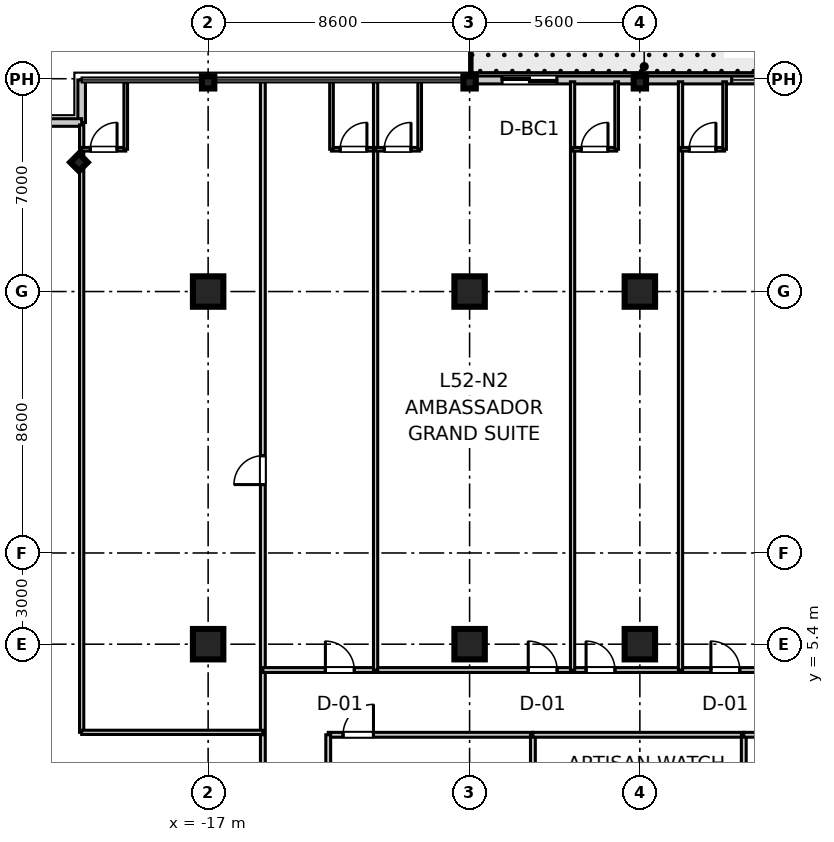
"""IFC4 building model, lengths in metres.
Left out: names, types, materials, properties, quantities, classifications, styles, units other than length and angle.
Written with IfcOpenShell. Run it as: python <this file> out.ifc"""

import sys

from ifc_helpers import new_model, si_unit, direction, frame, frame_2d, origin, origin_2d, place, context, subcontext, project, spatial, rectangle, i_section, extrude, source, transform, mapped, element, fill, save


model = new_model("IFC4")
c1 = context("Model", 3, precision=1e-05, world=origin(), true_north=direction((0.0, 1.0)))
c2 = subcontext(c1, "Body", "Model", "MODEL_VIEW")
j1 = project(units=[si_unit("LENGTHUNIT", "METRE"), si_unit("PLANEANGLEUNIT", "RADIAN")], contexts=[c1])
p1 = place(None, origin())
s1 = spatial("IfcSite", under=j1, at=p1, CompositionType="ELEMENT")
p2 = place(p1, origin())
s2 = spatial("IfcBuilding", under=s1, at=p2, CompositionType="ELEMENT")
p3 = place(p2, frame((0.0, 0.0, 204.9)))
s3 = spatial("IfcBuildingStorey", under=s2, at=p3, CompositionType="ELEMENT", Elevation=204.9)
m1 = source(origin(), c2, "Body", "SweptSolid", [
    extrude(rectangle(XDim=1.0, YDim=1.0, at=origin_2d()), origin(), (0.0, 0.0, 1.0), 3.655),
])
for number, where, z_axis, x_axis in (
    (1, (-17.0, 5.4, 0.0), (0.0, 0.0, 1.0), (1.0, 0.0, 0.0)),
    (2, (-17.0, 17.0, 0.0), (0.0, 0.0, 1.0), (1.0, 0.0, 0.0)),
    (3, (-8.4, 5.4, 0.0), (0.0, 0.0, 1.0), (1.0, 0.0, 0.0)),
    (4, (-8.4, 17.0, 0.0), (0.0, 0.0, 1.0), (1.0, 0.0, 0.0)),
    (5, (-2.8, 5.4, 0.0), (0.0, 0.0, 1.0), (1.0, 0.0, 0.0)),
    (6, (-2.8, 17.0, 0.0), (0.0, 0.0, 1.0), (1.0, 0.0, 0.0)),
):
    element("IfcColumn", number, at=place(p3, frame(where, z_axis=z_axis, x_axis=x_axis)), inside=s3, PredefinedType="COLUMN", context=c2, shape_type="MappedRepresentation", body=[
        mapped(m1, transform((0.0, 0.0, 0.0), scale=1.0)),
    ])
m2 = source(origin(), c2, "Body", "SweptSolid", [
    extrude(i_section(OverallWidth=0.401, OverallDepth=0.406, WebThickness=0.016, FlangeThickness=0.025, at=origin_2d()), origin(), (0.0, 0.0, 1.0), 3.655),
])
for number, where, z_axis, x_axis in (
    (7, (-17.0, 23.88, 0.0), (0.0, 0.0, 1.0), (0.0, 1.0, 0.0)),
    (8, (-8.4, 23.88, 0.0), (0.0, 0.0, 1.0), (0.0, 1.0, 0.0)),
    (9, (-2.8, 23.88, 0.0), (0.0, 0.0, 1.0), (0.0, 1.0, 0.0)),
    (10, (-21.25, 21.25, 0.0), (0.0, 0.0, 1.0), (0.707, 0.707, 0.0)),
):
    element("IfcColumn", number, at=place(p3, frame(where, z_axis=z_axis, x_axis=x_axis)), inside=s3, PredefinedType="COLUMN", context=c2, shape_type="MappedRepresentation", body=[
        mapped(m2, transform((0.0, 0.0, 0.0), scale=1.0)),
    ])
m3 = source(origin(), c2, "Body", "SweptSolid", [
    extrude(rectangle(XDim=1.4, YDim=0.25, at=frame_2d((0.7, 0.0))), origin(), (0.0, 0.0, 1.0), 3.41),
])
p4 = place(p3, frame((-21.16, 22.56, 0.0), z_axis=(0.0, 0.0, 1.0), x_axis=(0.0, 1.0, 0.0)))
e11 = element("IfcWall", 11, at=p4, inside=s3, PredefinedType="STANDARD", context=c2, shape_type="MappedRepresentation", body=[
    mapped(m3, transform((0.0, 0.0, 0.0), scale=1.0)),
])
m4 = source(origin(), c2, "Body", "SweptSolid", [
    extrude(rectangle(XDim=1.4, YDim=0.25, at=frame_2d((0.7, 0.0))), origin(), (0.0, 0.0, 1.0), 3.41),
])
p5 = place(p3, frame((-22.56, 22.56, 0.0), z_axis=(0.0, 0.0, 1.0), x_axis=(1.0, 0.0, 0.0)))
e12 = element("IfcWall", 12, at=p5, inside=s3, PredefinedType="STANDARD", context=c2, shape_type="MappedRepresentation", body=[
    mapped(m4, transform((0.0, 0.0, 0.0), scale=1.0)),
])
m5 = source(origin(), c2, "Body", "SweptSolid", [
    extrude(rectangle(XDim=11.2, YDim=0.26, at=frame_2d((5.6, 0.0))), origin(), (0.0, 0.0, 1.0), 2.89),
])
p6 = place(p3, frame((-8.4, 23.96, 0.0), z_axis=(0.0, 0.0, 1.0), x_axis=(1.0, 0.0, 0.0)))
e13 = element("IfcWall", 13, at=p6, inside=s3, PredefinedType="STANDARD", context=c2, shape_type="MappedRepresentation", body=[
    mapped(m5, transform((0.0, 0.0, 0.0), scale=1.0)),
])
p7 = place(p6, frame((1.069, 0.0, 0.0)))
e14 = element("IfcOpeningElement", 14, at=p7, cuts=e13, PredefinedType="OPENING", context=c2, shape_type="SweptSolid", body=[
    extrude(rectangle(XDim=1.8, YDim=2.25, at=frame_2d((0.9, 1.125))), frame((0.0, 0.14, 0.0), z_axis=(0.0, -1.0, 0.0), x_axis=(1.0, 0.0, 0.0)), (0.0, 0.0, 1.0), 0.28),
])
p8 = place(p6, frame((8.619, 0.0, 0.85)))
e15 = element("IfcOpeningElement", 15, at=p8, cuts=e13, PredefinedType="OPENING", context=c2, shape_type="SweptSolid", body=[
    extrude(rectangle(XDim=1.8, YDim=1.5, at=frame_2d((0.9, 0.75))), frame((0.0, 0.14, 0.0), z_axis=(0.0, -1.0, 0.0), x_axis=(1.0, 0.0, 0.0)), (0.0, 0.0, 1.0), 0.28),
])
m6 = source(origin(), c2, "Body", "SweptSolid", [
    extrude(rectangle(XDim=21.4, YDim=0.16, at=frame_2d((10.7, 0.0))), origin(), (0.0, 0.0, 1.0), 2.75),
])
p9 = place(p3, frame((-15.2, 2.5, 0.0), z_axis=(0.0, 0.0, 1.0), x_axis=(0.0, 1.0, 0.0)))
e16 = element("IfcWall", 16, at=p9, inside=s3, PredefinedType="PARTITIONING", context=c2, shape_type="MappedRepresentation", body=[
    mapped(m6, transform((0.0, 0.0, 0.0), scale=1.0)),
])
p10 = place(p9, frame((8.15, 0.0, 0.0)))
e17 = element("IfcOpeningElement", 17, at=p10, cuts=e16, PredefinedType="OPENING", context=c2, shape_type="SweptSolid", body=[
    extrude(rectangle(XDim=0.95, YDim=2.1, at=frame_2d((0.475, 1.05))), frame((0.0, 0.09, 0.0), z_axis=(0.0, -1.0, 0.0), x_axis=(1.0, 0.0, 0.0)), (0.0, 0.0, 1.0), 0.18),
])
m7 = source(origin(), c2, "Body", "SweptSolid", [
    extrude(rectangle(XDim=19.98, YDim=0.14, at=frame_2d((9.99, 0.0))), origin(), (0.0, 0.0, 1.0), 2.75),
])
p11 = place(p3, frame((-21.16, 2.5, 0.0), z_axis=(0.0, 0.0, 1.0), x_axis=(0.0, 1.0, 0.0)))
e18 = element("IfcWall", 18, at=p11, inside=s3, PredefinedType="PARTITIONING", context=c2, shape_type="MappedRepresentation", body=[
    mapped(m7, transform((0.0, 0.0, 0.0), scale=1.0)),
])
m8 = source(origin(), c2, "Body", "SweptSolid", [
    extrude(rectangle(XDim=5.96, YDim=0.14, at=frame_2d((2.98, 0.0))), origin(), (0.0, 0.0, 1.0), 2.75),
])
p12 = place(p3, frame((-21.16, 2.5, 0.0), z_axis=(0.0, 0.0, 1.0), x_axis=(1.0, 0.0, 0.0)))
e19 = element("IfcWall", 19, at=p12, inside=s3, PredefinedType="PARTITIONING", context=c2, shape_type="MappedRepresentation", body=[
    mapped(m8, transform((0.0, 0.0, 0.0), scale=1.0)),
])
m9 = source(origin(), c2, "Body", "SweptSolid", [
    extrude(rectangle(XDim=1.45, YDim=0.12, at=frame_2d((0.725, 0.0))), origin(), (0.0, 0.0, 1.0), 2.75),
])
p13 = place(p3, frame((-21.16, 21.68, 0.0), z_axis=(0.0, 0.0, 1.0), x_axis=(1.0, 0.0, 0.0)))
e20 = element("IfcWall", 20, at=p13, inside=s3, PredefinedType="PARTITIONING", context=c2, shape_type="MappedRepresentation", body=[
    mapped(m9, transform((0.0, 0.0, 0.0), scale=1.0)),
])
p14 = place(p13, frame((0.285, 0.0, 0.0)))
e21 = element("IfcOpeningElement", 21, at=p14, cuts=e20, PredefinedType="OPENING", context=c2, shape_type="SweptSolid", body=[
    extrude(rectangle(XDim=0.88, YDim=2.1, at=frame_2d((0.44, 1.05))), frame((0.0, 0.07, 0.0), z_axis=(0.0, -1.0, 0.0), x_axis=(1.0, 0.0, 0.0)), (0.0, 0.0, 1.0), 0.14),
])
m10 = source(origin(), c2, "Body", "SweptSolid", [
    extrude(rectangle(XDim=2.22, YDim=0.12, at=frame_2d((1.11, 0.0))), origin(), (0.0, 0.0, 1.0), 2.75),
])
p15 = place(p3, frame((-19.71, 21.68, 0.0), z_axis=(0.0, 0.0, 1.0), x_axis=(0.0, 1.0, 0.0)))
e22 = element("IfcWall", 22, at=p15, inside=s3, PredefinedType="PARTITIONING", context=c2, shape_type="MappedRepresentation", body=[
    mapped(m10, transform((0.0, 0.0, 0.0), scale=1.0)),
])
m11 = source(origin(), c2, "Body", "SweptSolid", [
    extrude(rectangle(XDim=18.54, YDim=0.16, at=frame_2d((9.27, 0.0))), origin(), (0.0, 0.0, 1.0), 2.75),
])
p16 = place(p3, frame((-15.2, 4.55, 0.0), z_axis=(0.0, 0.0, 1.0), x_axis=(1.0, 0.0, 0.0)))
e23 = element("IfcWall", 23, at=p16, inside=s3, PredefinedType="PARTITIONING", context=c2, shape_type="MappedRepresentation", body=[
    mapped(m11, transform((0.0, 0.0, 0.0), scale=1.0)),
])
p17 = place(p16, frame((2.057, 0.0, 0.0)))
e24 = element("IfcOpeningElement", 24, at=p17, cuts=e23, PredefinedType="OPENING", context=c2, shape_type="SweptSolid", body=[
    extrude(rectangle(XDim=0.95, YDim=2.1, at=frame_2d((0.475, 1.05))), frame((0.0, 0.09, 0.0), z_axis=(0.0, -1.0, 0.0), x_axis=(1.0, 0.0, 0.0)), (0.0, 0.0, 1.0), 0.18),
])
p18 = place(p16, frame((8.729, 0.0, 0.0)))
e25 = element("IfcOpeningElement", 25, at=p18, cuts=e23, PredefinedType="OPENING", context=c2, shape_type="SweptSolid", body=[
    extrude(rectangle(XDim=0.95, YDim=2.1, at=frame_2d((0.475, 1.05))), frame((0.0, 0.09, 0.0), z_axis=(0.0, -1.0, 0.0), x_axis=(1.0, 0.0, 0.0)), (0.0, 0.0, 1.0), 0.18),
])
p19 = place(p16, frame((10.631, 0.0, 0.0)))
e26 = element("IfcOpeningElement", 26, at=p19, cuts=e23, PredefinedType="OPENING", context=c2, shape_type="SweptSolid", body=[
    extrude(rectangle(XDim=0.95, YDim=2.1, at=frame_2d((0.475, 1.05))), frame((0.0, 0.09, 0.0), z_axis=(0.0, -1.0, 0.0), x_axis=(1.0, 0.0, 0.0)), (0.0, 0.0, 1.0), 0.18),
])
p20 = place(p16, frame((14.737, 0.0, 0.0)))
e27 = element("IfcOpeningElement", 27, at=p20, cuts=e23, PredefinedType="OPENING", context=c2, shape_type="SweptSolid", body=[
    extrude(rectangle(XDim=0.95, YDim=2.1, at=frame_2d((0.475, 1.05))), frame((0.0, 0.09, 0.0), z_axis=(0.0, -1.0, 0.0), x_axis=(1.0, 0.0, 0.0)), (0.0, 0.0, 1.0), 0.18),
])
p21 = place(p3, frame((-12.942, 21.68, 0.0), z_axis=(0.0, 0.0, 1.0), x_axis=(1.0, 0.0, 0.0)))
e28 = element("IfcWall", 28, at=p21, inside=s3, PredefinedType="PARTITIONING", context=c2, shape_type="MappedRepresentation", body=[
    mapped(m9, transform((0.0, 0.0, 0.0), scale=1.0)),
])
p22 = place(p21, frame((0.285, 0.0, 0.0)))
e29 = element("IfcOpeningElement", 29, at=p22, cuts=e28, PredefinedType="OPENING", context=c2, shape_type="SweptSolid", body=[
    extrude(rectangle(XDim=0.88, YDim=2.1, at=frame_2d((0.44, 1.05))), frame((0.0, 0.07, 0.0), z_axis=(0.0, -1.0, 0.0), x_axis=(1.0, 0.0, 0.0)), (0.0, 0.0, 1.0), 0.14),
])
p23 = place(p3, frame((-12.942, 21.68, 0.0), z_axis=(0.0, 0.0, 1.0), x_axis=(0.0, 1.0, 0.0)))
e30 = element("IfcWall", 30, at=p23, inside=s3, PredefinedType="PARTITIONING", context=c2, shape_type="MappedRepresentation", body=[
    mapped(m10, transform((0.0, 0.0, 0.0), scale=1.0)),
])
m12 = source(origin(), c2, "Body", "SweptSolid", [
    extrude(rectangle(XDim=19.35, YDim=0.14, at=frame_2d((9.675, 0.0))), origin(), (0.0, 0.0, 1.0), 2.75),
])
p24 = place(p3, frame((-11.492, 4.55, 0.0), z_axis=(0.0, 0.0, 1.0), x_axis=(0.0, 1.0, 0.0)))
e31 = element("IfcWall", 31, at=p24, inside=s3, PredefinedType="PARTITIONING", context=c2, shape_type="MappedRepresentation", body=[
    mapped(m12, transform((0.0, 0.0, 0.0), scale=1.0)),
])
p25 = place(p3, frame((-11.492, 21.68, 0.0), z_axis=(0.0, 0.0, 1.0), x_axis=(1.0, 0.0, 0.0)))
e32 = element("IfcWall", 32, at=p25, inside=s3, PredefinedType="PARTITIONING", context=c2, shape_type="MappedRepresentation", body=[
    mapped(m9, transform((0.0, 0.0, 0.0), scale=1.0)),
])
p26 = place(p25, frame((0.285, 0.0, 0.0)))
e33 = element("IfcOpeningElement", 33, at=p26, cuts=e32, PredefinedType="OPENING", context=c2, shape_type="SweptSolid", body=[
    extrude(rectangle(XDim=0.88, YDim=2.1, at=frame_2d((0.44, 1.05))), frame((0.0, 0.07, 0.0), z_axis=(0.0, -1.0, 0.0), x_axis=(1.0, 0.0, 0.0)), (0.0, 0.0, 1.0), 0.14),
])
p27 = place(p3, frame((-10.042, 21.68, 0.0), z_axis=(0.0, 0.0, 1.0), x_axis=(0.0, 1.0, 0.0)))
e34 = element("IfcWall", 34, at=p27, inside=s3, PredefinedType="PARTITIONING", context=c2, shape_type="MappedRepresentation", body=[
    mapped(m10, transform((0.0, 0.0, 0.0), scale=1.0)),
])
p28 = place(p3, frame((-5.013, 4.55, 0.0), z_axis=(0.0, 0.0, 1.0), x_axis=(0.0, 1.0, 0.0)))
e35 = element("IfcWall", 35, at=p28, inside=s3, PredefinedType="PARTITIONING", context=c2, shape_type="MappedRepresentation", body=[
    mapped(m12, transform((0.0, 0.0, 0.0), scale=1.0)),
])
p29 = place(p3, frame((-5.013, 21.68, 0.0), z_axis=(0.0, 0.0, 1.0), x_axis=(1.0, 0.0, 0.0)))
e36 = element("IfcWall", 36, at=p29, inside=s3, PredefinedType="PARTITIONING", context=c2, shape_type="MappedRepresentation", body=[
    mapped(m9, transform((0.0, 0.0, 0.0), scale=1.0)),
])
p30 = place(p29, frame((0.285, 0.0, 0.0)))
e37 = element("IfcOpeningElement", 37, at=p30, cuts=e36, PredefinedType="OPENING", context=c2, shape_type="SweptSolid", body=[
    extrude(rectangle(XDim=0.88, YDim=2.1, at=frame_2d((0.44, 1.05))), frame((0.0, 0.07, 0.0), z_axis=(0.0, -1.0, 0.0), x_axis=(1.0, 0.0, 0.0)), (0.0, 0.0, 1.0), 0.14),
])
p31 = place(p3, frame((-3.563, 21.68, 0.0), z_axis=(0.0, 0.0, 1.0), x_axis=(0.0, 1.0, 0.0)))
e38 = element("IfcWall", 38, at=p31, inside=s3, PredefinedType="PARTITIONING", context=c2, shape_type="MappedRepresentation", body=[
    mapped(m10, transform((0.0, 0.0, 0.0), scale=1.0)),
])
p32 = place(p3, frame((-1.463, 4.55, 0.0), z_axis=(0.0, 0.0, 1.0), x_axis=(0.0, 1.0, 0.0)))
e39 = element("IfcWall", 39, at=p32, inside=s3, PredefinedType="PARTITIONING", context=c2, shape_type="MappedRepresentation", body=[
    mapped(m12, transform((0.0, 0.0, 0.0), scale=1.0)),
])
p33 = place(p3, frame((-1.463, 21.68, 0.0), z_axis=(0.0, 0.0, 1.0), x_axis=(1.0, 0.0, 0.0)))
e40 = element("IfcWall", 40, at=p33, inside=s3, PredefinedType="PARTITIONING", context=c2, shape_type="MappedRepresentation", body=[
    mapped(m9, transform((0.0, 0.0, 0.0), scale=1.0)),
])
p34 = place(p33, frame((0.285, 0.0, 0.0)))
e41 = element("IfcOpeningElement", 41, at=p34, cuts=e40, PredefinedType="OPENING", context=c2, shape_type="SweptSolid", body=[
    extrude(rectangle(XDim=0.88, YDim=2.1, at=frame_2d((0.44, 1.05))), frame((0.0, 0.07, 0.0), z_axis=(0.0, -1.0, 0.0), x_axis=(1.0, 0.0, 0.0)), (0.0, 0.0, 1.0), 0.14),
])
p35 = place(p3, frame((-0.013, 21.68, 0.0), z_axis=(0.0, 0.0, 1.0), x_axis=(0.0, 1.0, 0.0)))
e42 = element("IfcWall", 42, at=p35, inside=s3, PredefinedType="PARTITIONING", context=c2, shape_type="MappedRepresentation", body=[
    mapped(m10, transform((0.0, 0.0, 0.0), scale=1.0)),
])
m13 = source(origin(), c2, "Body", "SweptSolid", [
    extrude(rectangle(XDim=4.84, YDim=0.16, at=frame_2d((2.42, 0.0))), origin(), (0.0, 0.0, 1.0), 2.75),
])
p36 = place(p3, frame((-15.2, -2.42, 0.0), z_axis=(0.0, 0.0, 1.0), x_axis=(0.0, 1.0, 0.0)))
e43 = element("IfcWall", 43, at=p36, inside=s3, PredefinedType="PARTITIONING", context=c2, shape_type="MappedRepresentation", body=[
    mapped(m13, transform((0.0, 0.0, 0.0), scale=1.0)),
])
p37 = place(p36, frame((1.945, 0.0, 0.0)))
e44 = element("IfcOpeningElement", 44, at=p37, cuts=e43, PredefinedType="OPENING", context=c2, shape_type="SweptSolid", body=[
    extrude(rectangle(XDim=0.95, YDim=2.1, at=frame_2d((0.475, 1.05))), frame((0.0, 0.09, 0.0), z_axis=(0.0, -1.0, 0.0), x_axis=(1.0, 0.0, 0.0)), (0.0, 0.0, 1.0), 0.18),
])
m14 = source(origin(), c2, "Body", "SweptSolid", [
    extrude(rectangle(XDim=6.732, YDim=0.16, at=frame_2d((3.366, 0.0))), origin(), (0.0, 0.0, 1.0), 2.75),
])
p38 = place(p3, frame((-13.05, 2.42, 0.0), z_axis=(0.0, 0.0, 1.0), x_axis=(1.0, 0.0, 0.0)))
e45 = element("IfcWall", 45, at=p38, inside=s3, PredefinedType="PARTITIONING", context=c2, shape_type="MappedRepresentation", body=[
    mapped(m14, transform((0.0, 0.0, 0.0), scale=1.0)),
])
p39 = place(p38, frame((0.488, 0.0, 0.0)))
e46 = element("IfcOpeningElement", 46, at=p39, cuts=e45, PredefinedType="OPENING", context=c2, shape_type="SweptSolid", body=[
    extrude(rectangle(XDim=1.0, YDim=2.1, at=frame_2d((0.5, 1.05))), frame((0.0, 0.09, 0.0), z_axis=(0.0, -1.0, 0.0), x_axis=(1.0, 0.0, 0.0)), (0.0, 0.0, 1.0), 0.18),
])
for number, where, z_axis, x_axis in (
    (47, (-13.05, -2.42, 0.0), (0.0, 0.0, 1.0), (0.0, 1.0, 0.0)),
    (48, (-6.318, -2.42, 0.0), (0.0, 0.0, 1.0), (0.0, 1.0, 0.0)),
):
    element("IfcWall", number, at=place(p3, frame(where, z_axis=z_axis, x_axis=x_axis)), inside=s3, PredefinedType="PARTITIONING", context=c2, shape_type="MappedRepresentation", body=[
        mapped(m13, transform((0.0, 0.0, 0.0), scale=1.0)),
    ])
m15 = source(origin(), c2, "Body", "SweptSolid", [
    extrude(rectangle(XDim=6.936, YDim=0.16, at=frame_2d((3.468, 0.0))), origin(), (0.0, 0.0, 1.0), 2.75),
])
p40 = place(p3, frame((-6.318, 2.42, 0.0), z_axis=(0.0, 0.0, 1.0), x_axis=(1.0, 0.0, 0.0)))
e49 = element("IfcWall", 49, at=p40, inside=s3, PredefinedType="PARTITIONING", context=c2, shape_type="MappedRepresentation", body=[
    mapped(m15, transform((0.0, 0.0, 0.0), scale=1.0)),
])
p41 = place(p3, frame((0.618, -2.42, 0.0), z_axis=(0.0, 0.0, 1.0), x_axis=(0.0, 1.0, 0.0)))
e50 = element("IfcWall", 50, at=p41, inside=s3, PredefinedType="PARTITIONING", context=c2, shape_type="MappedRepresentation", body=[
    mapped(m13, transform((0.0, 0.0, 0.0), scale=1.0)),
])
m16 = source(origin(), c2, "Body", "SweptSolid", [
    extrude(rectangle(XDim=6.732, YDim=0.16, at=frame_2d((3.366, 0.0))), origin(), (0.0, 0.0, 1.0), 2.75),
])
p42 = place(p3, frame((0.618, 2.42, 0.0), z_axis=(0.0, 0.0, 1.0), x_axis=(1.0, 0.0, 0.0)))
e51 = element("IfcWall", 51, at=p42, inside=s3, PredefinedType="PARTITIONING", context=c2, shape_type="MappedRepresentation", body=[
    mapped(m16, transform((0.0, 0.0, 0.0), scale=1.0)),
])
p43 = place(p42, frame((4.379, 0.0, 0.0)))
e52 = element("IfcOpeningElement", 52, at=p43, cuts=e51, PredefinedType="OPENING", context=c2, shape_type="SweptSolid", body=[
    extrude(rectangle(XDim=1.0, YDim=2.1, at=frame_2d((0.5, 1.05))), frame((0.0, 0.09, 0.0), z_axis=(0.0, -1.0, 0.0), x_axis=(1.0, 0.0, 0.0)), (0.0, 0.0, 1.0), 0.18),
])
m17 = source(origin(), c2, "Body", "SweptSolid", [
    extrude(rectangle(XDim=0.88, YDim=2.1, at=frame_2d((0.44, 1.05))), frame((0.0, 0.025, 0.0), z_axis=(0.0, -1.0, 0.0), x_axis=(1.0, 0.0, 0.0)), (0.0, 0.0, 1.0), 0.05),
])
p44 = place(p14, origin())
e53 = element("IfcDoor", 53, at=p44, inside=s3, OperationType="SINGLE_SWING_RIGHT", PredefinedType="DOOR", context=c2, shape_type="MappedRepresentation", body=[
    mapped(m17, transform((0.0, 0.0, 0.0), scale=1.0)),
])
fill(e21, e53)
m18 = source(origin(), c2, "Body", "SweptSolid", [
    extrude(rectangle(XDim=0.95, YDim=2.1, at=frame_2d((0.475, 1.05))), frame((0.0, 0.025, 0.0), z_axis=(0.0, -1.0, 0.0), x_axis=(1.0, 0.0, 0.0)), (0.0, 0.0, 1.0), 0.05),
])
p45 = place(p10, origin())
e54 = element("IfcDoor", 54, at=p45, inside=s3, OperationType="SINGLE_SWING_LEFT", PredefinedType="DOOR", context=c2, shape_type="MappedRepresentation", body=[
    mapped(m18, transform((0.0, 0.0, 0.0), scale=1.0)),
])
fill(e17, e54)
p46 = place(p22, origin())
e55 = element("IfcDoor", 55, at=p46, inside=s3, OperationType="SINGLE_SWING_RIGHT", PredefinedType="DOOR", context=c2, shape_type="MappedRepresentation", body=[
    mapped(m17, transform((0.0, 0.0, 0.0), scale=1.0)),
])
fill(e29, e55)
p47 = place(p17, origin())
e56 = element("IfcDoor", 56, at=p47, inside=s3, OperationType="SINGLE_SWING_LEFT", PredefinedType="DOOR", context=c2, shape_type="MappedRepresentation", body=[
    mapped(m18, transform((0.0, 0.0, 0.0), scale=1.0)),
])
fill(e24, e56)
p48 = place(p26, origin())
e57 = element("IfcDoor", 57, at=p48, inside=s3, OperationType="SINGLE_SWING_RIGHT", PredefinedType="DOOR", context=c2, shape_type="MappedRepresentation", body=[
    mapped(m17, transform((0.0, 0.0, 0.0), scale=1.0)),
])
fill(e33, e57)
p49 = place(p18, origin())
e58 = element("IfcDoor", 58, at=p49, inside=s3, OperationType="SINGLE_SWING_LEFT", PredefinedType="DOOR", context=c2, shape_type="MappedRepresentation", body=[
    mapped(m18, transform((0.0, 0.0, 0.0), scale=1.0)),
])
fill(e25, e58)
p50 = place(p30, origin())
e59 = element("IfcDoor", 59, at=p50, inside=s3, OperationType="SINGLE_SWING_RIGHT", PredefinedType="DOOR", context=c2, shape_type="MappedRepresentation", body=[
    mapped(m17, transform((0.0, 0.0, 0.0), scale=1.0)),
])
fill(e37, e59)
p51 = place(p19, origin())
e60 = element("IfcDoor", 60, at=p51, inside=s3, OperationType="SINGLE_SWING_LEFT", PredefinedType="DOOR", context=c2, shape_type="MappedRepresentation", body=[
    mapped(m18, transform((0.0, 0.0, 0.0), scale=1.0)),
])
fill(e26, e60)
p52 = place(p34, origin())
e61 = element("IfcDoor", 61, at=p52, inside=s3, OperationType="SINGLE_SWING_RIGHT", PredefinedType="DOOR", context=c2, shape_type="MappedRepresentation", body=[
    mapped(m17, transform((0.0, 0.0, 0.0), scale=1.0)),
])
fill(e41, e61)
p53 = place(p20, origin())
e62 = element("IfcDoor", 62, at=p53, inside=s3, OperationType="SINGLE_SWING_LEFT", PredefinedType="DOOR", context=c2, shape_type="MappedRepresentation", body=[
    mapped(m18, transform((0.0, 0.0, 0.0), scale=1.0)),
])
fill(e27, e62)
m19 = source(origin(), c2, "Body", "SweptSolid", [
    extrude(rectangle(XDim=1.0, YDim=2.1, at=frame_2d((0.5, 1.05))), frame((0.0, 0.025, 0.0), z_axis=(0.0, -1.0, 0.0), x_axis=(1.0, 0.0, 0.0)), (0.0, 0.0, 1.0), 0.05),
])
p54 = place(p39, frame((1.0, 0.0, 0.0), z_axis=(0.0, 0.0, 1.0), x_axis=(-1.0, 0.0, 0.0)))
e63 = element("IfcDoor", 63, at=p54, inside=s3, OperationType="SINGLE_SWING_RIGHT", PredefinedType="DOOR", context=c2, shape_type="MappedRepresentation", body=[
    mapped(m19, transform((0.0, 0.0, 0.0), scale=1.0)),
])
fill(e46, e63)
m20 = source(origin(), c2, "Body", "SweptSolid", [
    extrude(rectangle(XDim=1.8, YDim=2.25, at=frame_2d((0.9, 1.125))), frame((0.0, 0.025, 0.0), z_axis=(0.0, -1.0, 0.0), x_axis=(1.0, 0.0, 0.0)), (0.0, 0.0, 1.0), 0.05),
])
p55 = place(p7, origin())
e64 = element("IfcDoor", 64, at=p55, inside=s3, OperationType="DOUBLE_DOOR_SLIDING", PredefinedType="DOOR", context=c2, shape_type="MappedRepresentation", body=[
    mapped(m20, transform((0.0, 0.0, 0.0), scale=1.0)),
])
fill(e14, e64)
m21 = source(origin(), c2, "Body", "SweptSolid", [
    extrude(rectangle(XDim=1.8, YDim=1.5, at=frame_2d((0.9, 0.75))), frame((0.0, 0.03, 0.0), z_axis=(0.0, -1.0, 0.0), x_axis=(1.0, 0.0, 0.0)), (0.0, 0.0, 1.0), 0.06),
])
p56 = place(p8, origin())
e65 = element("IfcWindow", 65, at=p56, inside=s3, PartitioningType="SINGLE_PANEL", PredefinedType="WINDOW", context=c2, shape_type="MappedRepresentation", body=[
    mapped(m21, transform((0.0, 0.0, 0.0), scale=1.0)),
])
fill(e15, e65)
save(model, sys.argv[1])
